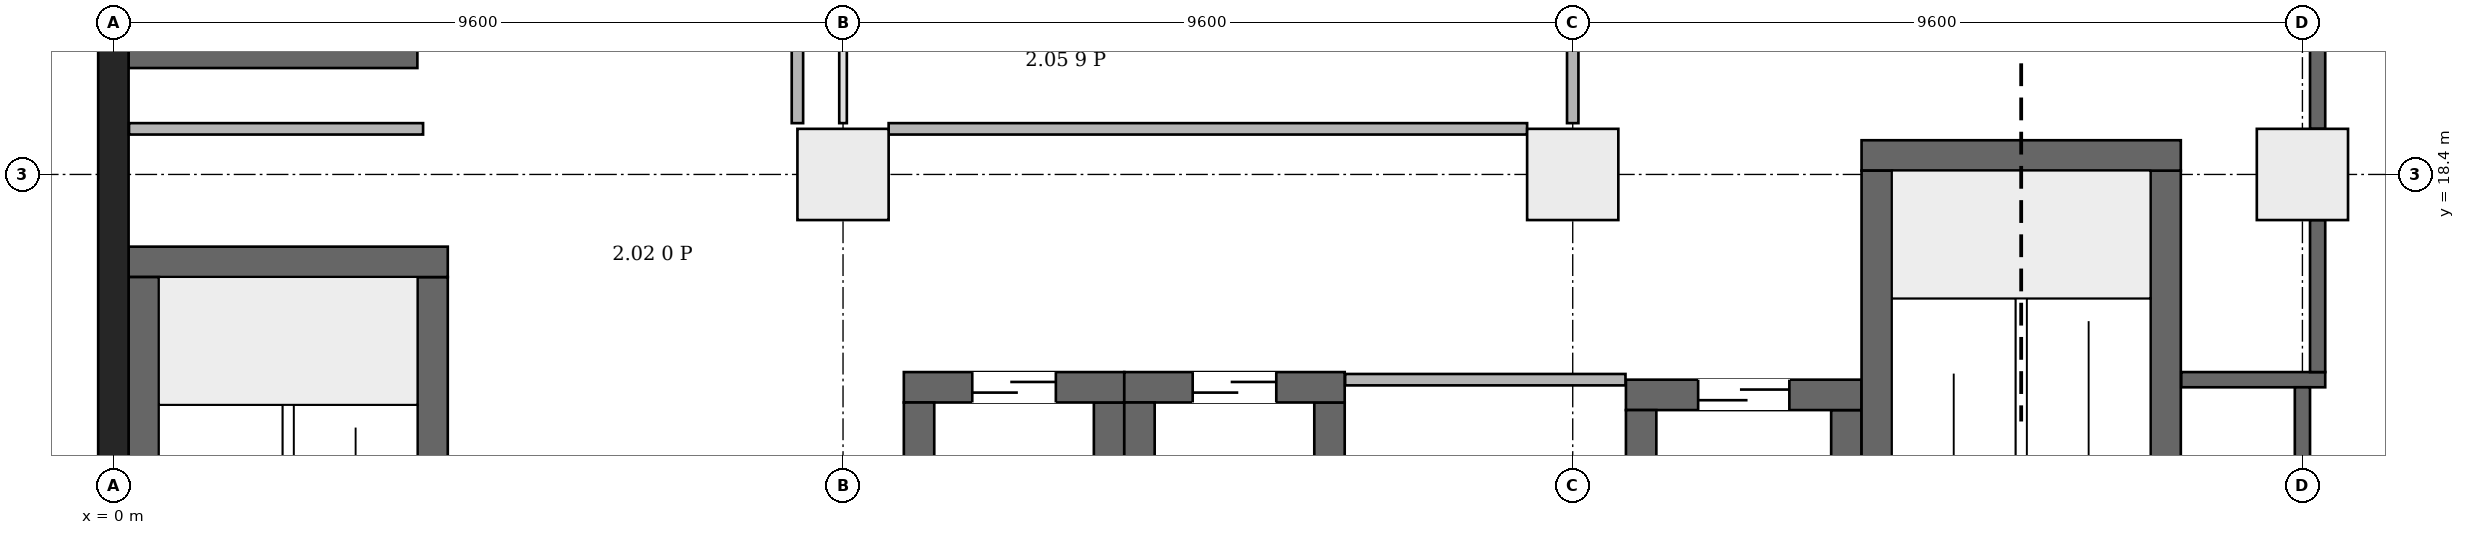
"""IFC4 building model, lengths in metres.
Left out: names, types, materials, properties, quantities, classifications, styles, units other than length and angle.
Written with IfcOpenShell. Run it as: python <this file> out.ifc"""

import sys

from ifc_helpers import new_model, si_unit, direction, frame, frame_2d, origin, origin_2d, place, context, subcontext, project, spatial, rectangle, extrude, element, fill, save


model = new_model("IFC4")
c1 = context("Model", 3, precision=1e-05, world=origin(), true_north=direction((0.0, 1.0)))
c2 = subcontext(c1, "Body", "Model", "MODEL_VIEW")
j1 = project(units=[si_unit("LENGTHUNIT", "METRE"), si_unit("PLANEANGLEUNIT", "RADIAN")], contexts=[c1])
p1 = place(None, origin())
s1 = spatial("IfcSite", under=j1, at=p1, CompositionType="ELEMENT")
p2 = place(p1, origin())
s2 = spatial("IfcBuilding", under=s1, at=p2, CompositionType="ELEMENT")
p3 = place(p2, frame((0.0, 0.0, 14.2)))
s3 = spatial("IfcBuildingStorey", under=s2, at=p3, CompositionType="ELEMENT", Elevation=14.2)
p4 = place(p3, frame((0.0, -0.2, 0.0), z_axis=(0.0, 0.0, 1.0), x_axis=(0.0, 1.0, 0.0)))
e1 = element("IfcWall", 1, at=p4, inside=s3, PredefinedType="SHEAR", context=c2, shape_type="SweptSolid", body=[
    extrude(rectangle(XDim=46.88, YDim=0.4, at=frame_2d((23.44, 0.0))), origin(), (0.0, 0.0, 1.0), 7.5),
])
p5 = place(p3, frame((0.2, 17.25, 0.0), z_axis=(0.0, 0.0, 1.0), x_axis=(1.0, 0.0, 0.0)))
e2 = element("IfcWall", 2, at=p5, inside=s3, PredefinedType="SHEAR", context=c2, shape_type="SweptSolid", body=[
    extrude(rectangle(XDim=4.2, YDim=0.4, at=frame_2d((2.1, 0.0))), origin(), (0.0, 0.0, 1.0), 7.5),
])
for number, where, z_axis, x_axis in (
    (3, (0.4, 10.45, 0.0), (0.0, 0.0, 1.0), (0.0, 1.0, 0.0)),
    (4, (4.2, 10.45, 0.0), (0.0, 0.0, 1.0), (0.0, 1.0, 0.0)),
):
    element("IfcWall", number, at=place(p3, frame(where, z_axis=z_axis, x_axis=x_axis)), inside=s3, PredefinedType="SHEAR", context=c2, shape_type="SweptSolid", body=[
        extrude(rectangle(XDim=6.6, YDim=0.4, at=frame_2d((3.3, 0.0))), origin(), (0.0, 0.0, 1.0), 7.5),
    ])
p6 = place(p3, frame((23.0, 18.65, 0.0), z_axis=(0.0, 0.0, 1.0), x_axis=(1.0, 0.0, 0.0)))
e5 = element("IfcWall", 5, at=p6, inside=s3, PredefinedType="SHEAR", context=c2, shape_type="SweptSolid", body=[
    extrude(rectangle(XDim=4.2, YDim=0.4, at=frame_2d((2.1, 0.0))), origin(), (0.0, 0.0, 1.0), 7.5),
])
for number, where, z_axis, x_axis in (
    (6, (23.2, 11.85, 0.0), (0.0, 0.0, 1.0), (0.0, 1.0, 0.0)),
    (7, (27.0, 11.85, 0.0), (0.0, 0.0, 1.0), (0.0, 1.0, 0.0)),
):
    element("IfcWall", number, at=place(p3, frame(where, z_axis=z_axis, x_axis=x_axis)), inside=s3, PredefinedType="SHEAR", context=c2, shape_type="SweptSolid", body=[
        extrude(rectangle(XDim=6.6, YDim=0.4, at=frame_2d((3.3, 0.0))), origin(), (0.0, 0.0, 1.0), 7.5),
    ])
p7 = place(p3, frame((0.2, 19.975, 0.0), z_axis=(0.0, 0.0, 1.0), x_axis=(1.0, 0.0, 0.0)))
e8 = element("IfcWall", 8, at=p7, inside=s3, PredefinedType="SHEAR", context=c2, shape_type="SweptSolid", body=[
    extrude(rectangle(XDim=3.8, YDim=0.35, at=frame_2d((1.9, 0.0))), origin(), (0.0, 0.0, 1.0), 7.5),
])
p8 = place(p3, frame((10.4, 15.6, 0.0), z_axis=(0.0, 0.0, 1.0), x_axis=(1.0, 0.0, 0.0)))
e9 = element("IfcWall", 9, at=p8, inside=s3, PredefinedType="SHEAR", context=c2, shape_type="SweptSolid", body=[
    extrude(rectangle(XDim=2.9, YDim=0.4, at=frame_2d((1.45, 0.0))), origin(), (0.0, 0.0, 1.0), 7.5),
])
p9 = place(p8, frame((0.9, 0.0, 0.0)))
e10 = element("IfcOpeningElement", 10, at=p9, cuts=e9, PredefinedType="OPENING", context=c2, shape_type="SweptSolid", body=[
    extrude(rectangle(XDim=1.1, YDim=2.1, at=frame_2d((0.55, 1.05))), frame((0.0, 0.21, 0.0), z_axis=(0.0, -1.0, 0.0), x_axis=(1.0, 0.0, 0.0)), (0.0, 0.0, 1.0), 0.42),
])
for number, where, z_axis, x_axis in (
    (11, (10.6, 12.4, 0.0), (0.0, 0.0, 1.0), (0.0, 1.0, 0.0)),
    (12, (13.1, 12.4, 0.0), (0.0, 0.0, 1.0), (0.0, 1.0, 0.0)),
):
    element("IfcWall", number, at=place(p3, frame(where, z_axis=z_axis, x_axis=x_axis)), inside=s3, PredefinedType="SHEAR", context=c2, shape_type="SweptSolid", body=[
        extrude(rectangle(XDim=3.0, YDim=0.4, at=frame_2d((1.5, 0.0))), origin(), (0.0, 0.0, 1.0), 7.5),
    ])
p10 = place(p3, frame((13.3, 15.6, 0.0), z_axis=(0.0, 0.0, 1.0), x_axis=(1.0, 0.0, 0.0)))
e13 = element("IfcWall", 13, at=p10, inside=s3, PredefinedType="SHEAR", context=c2, shape_type="SweptSolid", body=[
    extrude(rectangle(XDim=2.9, YDim=0.4, at=frame_2d((1.45, 0.0))), origin(), (0.0, 0.0, 1.0), 7.5),
])
p11 = place(p10, frame((0.9, 0.0, 0.0)))
e14 = element("IfcOpeningElement", 14, at=p11, cuts=e13, PredefinedType="OPENING", context=c2, shape_type="SweptSolid", body=[
    extrude(rectangle(XDim=1.1, YDim=2.1, at=frame_2d((0.55, 1.05))), frame((0.0, 0.21, 0.0), z_axis=(0.0, -1.0, 0.0), x_axis=(1.0, 0.0, 0.0)), (0.0, 0.0, 1.0), 0.42),
])
for number, where, z_axis, x_axis in (
    (15, (13.5, 12.4, 0.0), (0.0, 0.0, 1.0), (0.0, 1.0, 0.0)),
    (16, (16.0, 12.4, 0.0), (0.0, 0.0, 1.0), (0.0, 1.0, 0.0)),
):
    element("IfcWall", number, at=place(p3, frame(where, z_axis=z_axis, x_axis=x_axis)), inside=s3, PredefinedType="SHEAR", context=c2, shape_type="SweptSolid", body=[
        extrude(rectangle(XDim=3.0, YDim=0.4, at=frame_2d((1.5, 0.0))), origin(), (0.0, 0.0, 1.0), 7.5),
    ])
p12 = place(p3, frame((19.9, 15.5, 0.0), z_axis=(0.0, 0.0, 1.0), x_axis=(1.0, 0.0, 0.0)))
e17 = element("IfcWall", 17, at=p12, inside=s3, PredefinedType="SHEAR", context=c2, shape_type="SweptSolid", body=[
    extrude(rectangle(XDim=3.1, YDim=0.4, at=frame_2d((1.55, 0.0))), origin(), (0.0, 0.0, 1.0), 7.5),
])
p13 = place(p12, frame((0.95, 0.0, 0.0)))
e18 = element("IfcOpeningElement", 18, at=p13, cuts=e17, PredefinedType="OPENING", context=c2, shape_type="SweptSolid", body=[
    extrude(rectangle(XDim=1.2, YDim=2.1, at=frame_2d((0.6, 1.05))), frame((0.0, 0.21, 0.0), z_axis=(0.0, -1.0, 0.0), x_axis=(1.0, 0.0, 0.0)), (0.0, 0.0, 1.0), 0.42),
])
for number, where, z_axis, x_axis in (
    (19, (20.1, 11.9, 0.0), (0.0, 0.0, 1.0), (0.0, 1.0, 0.0)),
    (20, (22.8, 11.9, 0.0), (0.0, 0.0, 1.0), (0.0, 1.0, 0.0)),
):
    element("IfcWall", number, at=place(p3, frame(where, z_axis=z_axis, x_axis=x_axis)), inside=s3, PredefinedType="SHEAR", context=c2, shape_type="SweptSolid", body=[
        extrude(rectangle(XDim=3.4, YDim=0.4, at=frame_2d((1.7, 0.0))), origin(), (0.0, 0.0, 1.0), 7.5),
    ])
for number, where, z_axis, x_axis in (
    (21, (9.6, 18.4, 0.0), (0.0, 0.0, 1.0), (1.0, 0.0, 0.0)),
    (22, (19.2, 18.4, 0.0), (0.0, 0.0, 1.0), (1.0, 0.0, 0.0)),
    (23, (28.8, 18.4, 0.0), (0.0, 0.0, 1.0), (1.0, 0.0, 0.0)),
):
    element("IfcColumn", number, at=place(p3, frame(where, z_axis=z_axis, x_axis=x_axis)), inside=s3, PredefinedType="COLUMN", context=c2, shape_type="SweptSolid", body=[
        extrude(rectangle(XDim=1.2, YDim=1.2, at=origin_2d()), origin(), (0.0, 0.0, 1.0), 7.5),
    ])
p14 = place(p3, frame((0.206, 19.0, 0.0), z_axis=(0.0, 0.0, 1.0), x_axis=(1.0, 0.0, 0.0)))
e24 = element("IfcWall", 24, at=p14, inside=s3, PredefinedType="PARTITIONING", context=c2, shape_type="SweptSolid", body=[
    extrude(rectangle(XDim=3.869, YDim=0.15, at=frame_2d((1.935, 0.0))), origin(), (0.0, 0.0, 1.0), 7.15),
])
p15 = place(p3, frame((9.0, 19.075, 0.0), z_axis=(0.0, 0.0, 1.0), x_axis=(0.0, 1.0, 0.0)))
e25 = element("IfcWall", 25, at=p15, inside=s3, PredefinedType="PARTITIONING", context=c2, shape_type="SweptSolid", body=[
    extrude(rectangle(XDim=1.65, YDim=0.15, at=frame_2d((0.825, 0.0))), origin(), (0.0, 0.0, 1.0), 7.15),
])
p16 = place(p3, frame((9.6, 19.075, 0.0), z_axis=(0.0, 0.0, 1.0), x_axis=(0.0, 1.0, 0.0)))
e26 = element("IfcWall", 26, at=p16, inside=s3, PredefinedType="PARTITIONING", context=c2, shape_type="SweptSolid", body=[
    extrude(rectangle(XDim=1.65, YDim=0.1, at=frame_2d((0.825, 0.0))), origin(), (0.0, 0.0, 1.0), 6.75),
])
p17 = place(p3, frame((10.2, 19.0, 0.0), z_axis=(0.0, 0.0, 1.0), x_axis=(1.0, 0.0, 0.0)))
e27 = element("IfcWall", 27, at=p17, inside=s3, PredefinedType="PARTITIONING", context=c2, shape_type="SweptSolid", body=[
    extrude(rectangle(XDim=8.4, YDim=0.15, at=frame_2d((4.2, 0.0))), origin(), (0.0, 0.0, 1.0), 7.15),
])
p18 = place(p3, frame((16.206, 15.7, 0.0), z_axis=(0.0, 0.0, 1.0), x_axis=(1.0, 0.0, 0.0)))
e28 = element("IfcWall", 28, at=p18, inside=s3, PredefinedType="PARTITIONING", context=c2, shape_type="SweptSolid", body=[
    extrude(rectangle(XDim=3.688, YDim=0.15, at=frame_2d((1.844, 0.0))), origin(), (0.0, 0.0, 1.0), 7.15),
])
p19 = place(p3, frame((19.2, 19.075, 0.0), z_axis=(0.0, 0.0, 1.0), x_axis=(0.0, 1.0, 0.0)))
e29 = element("IfcWall", 29, at=p19, inside=s3, PredefinedType="PARTITIONING", context=c2, shape_type="SweptSolid", body=[
    extrude(rectangle(XDim=1.65, YDim=0.15, at=frame_2d((0.825, 0.0))), origin(), (0.0, 0.0, 1.0), 6.75),
])
p20 = place(p3, frame((27.206, 15.7, 0.0), z_axis=(0.0, 0.0, 1.0), x_axis=(1.0, 0.0, 0.0)))
e30 = element("IfcWall", 30, at=p20, inside=s3, PredefinedType="PARTITIONING", context=c2, shape_type="SweptSolid", body=[
    extrude(rectangle(XDim=1.894, YDim=0.2, at=frame_2d((0.947, 0.0))), origin(), (0.0, 0.0, 1.0), 7.15),
])
p21 = place(p3, frame((28.8, 11.6, 0.0), z_axis=(0.0, 0.0, 1.0), x_axis=(0.0, 1.0, 0.0)))
e31 = element("IfcWall", 31, at=p21, inside=s3, PredefinedType="PARTITIONING", context=c2, shape_type="SweptSolid", body=[
    extrude(rectangle(XDim=4.0, YDim=0.2, at=frame_2d((2.0, 0.0))), origin(), (0.0, 0.0, 1.0), 6.75),
])
p22 = place(p3, frame((29.0, 15.8, 0.0), z_axis=(0.0, 0.0, 1.0), x_axis=(0.0, 1.0, 0.0)))
e32 = element("IfcWall", 32, at=p22, inside=s3, PredefinedType="PARTITIONING", context=c2, shape_type="SweptSolid", body=[
    extrude(rectangle(XDim=2.0, YDim=0.2, at=frame_2d((1.0, 0.0))), origin(), (0.0, 0.0, 1.0), 6.75),
])
p23 = place(p3, frame((29.0, 19.0, 0.0), z_axis=(0.0, 0.0, 1.0), x_axis=(0.0, 1.0, 0.0)))
e33 = element("IfcWall", 33, at=p23, inside=s3, PredefinedType="PARTITIONING", context=c2, shape_type="SweptSolid", body=[
    extrude(rectangle(XDim=1.7, YDim=0.2, at=frame_2d((0.85, 0.0))), origin(), (0.0, 0.0, 1.0), 6.75),
])
p24 = place(p9, origin())
e34 = element("IfcDoor", 34, at=p24, inside=s3, OperationType="DOUBLE_DOOR_SLIDING", PredefinedType="DOOR", context=c2, shape_type="SweptSolid", body=[
    extrude(rectangle(XDim=1.1, YDim=2.1, at=frame_2d((0.55, 1.05))), frame((0.0, 0.025, 0.0), z_axis=(0.0, -1.0, 0.0), x_axis=(1.0, 0.0, 0.0)), (0.0, 0.0, 1.0), 0.05),
])
fill(e10, e34)
p25 = place(p11, origin())
e35 = element("IfcDoor", 35, at=p25, inside=s3, OperationType="DOUBLE_DOOR_SLIDING", PredefinedType="DOOR", context=c2, shape_type="SweptSolid", body=[
    extrude(rectangle(XDim=1.1, YDim=2.1, at=frame_2d((0.55, 1.05))), frame((0.0, 0.025, 0.0), z_axis=(0.0, -1.0, 0.0), x_axis=(1.0, 0.0, 0.0)), (0.0, 0.0, 1.0), 0.05),
])
fill(e14, e35)
p26 = place(p13, origin())
e36 = element("IfcDoor", 36, at=p26, inside=s3, OperationType="DOUBLE_DOOR_SLIDING", PredefinedType="DOOR", context=c2, shape_type="SweptSolid", body=[
    extrude(rectangle(XDim=1.2, YDim=2.1, at=frame_2d((0.6, 1.05))), frame((0.0, 0.025, 0.0), z_axis=(0.0, -1.0, 0.0), x_axis=(1.0, 0.0, 0.0)), (0.0, 0.0, 1.0), 0.05),
])
fill(e18, e36)
save(model, sys.argv[1])
